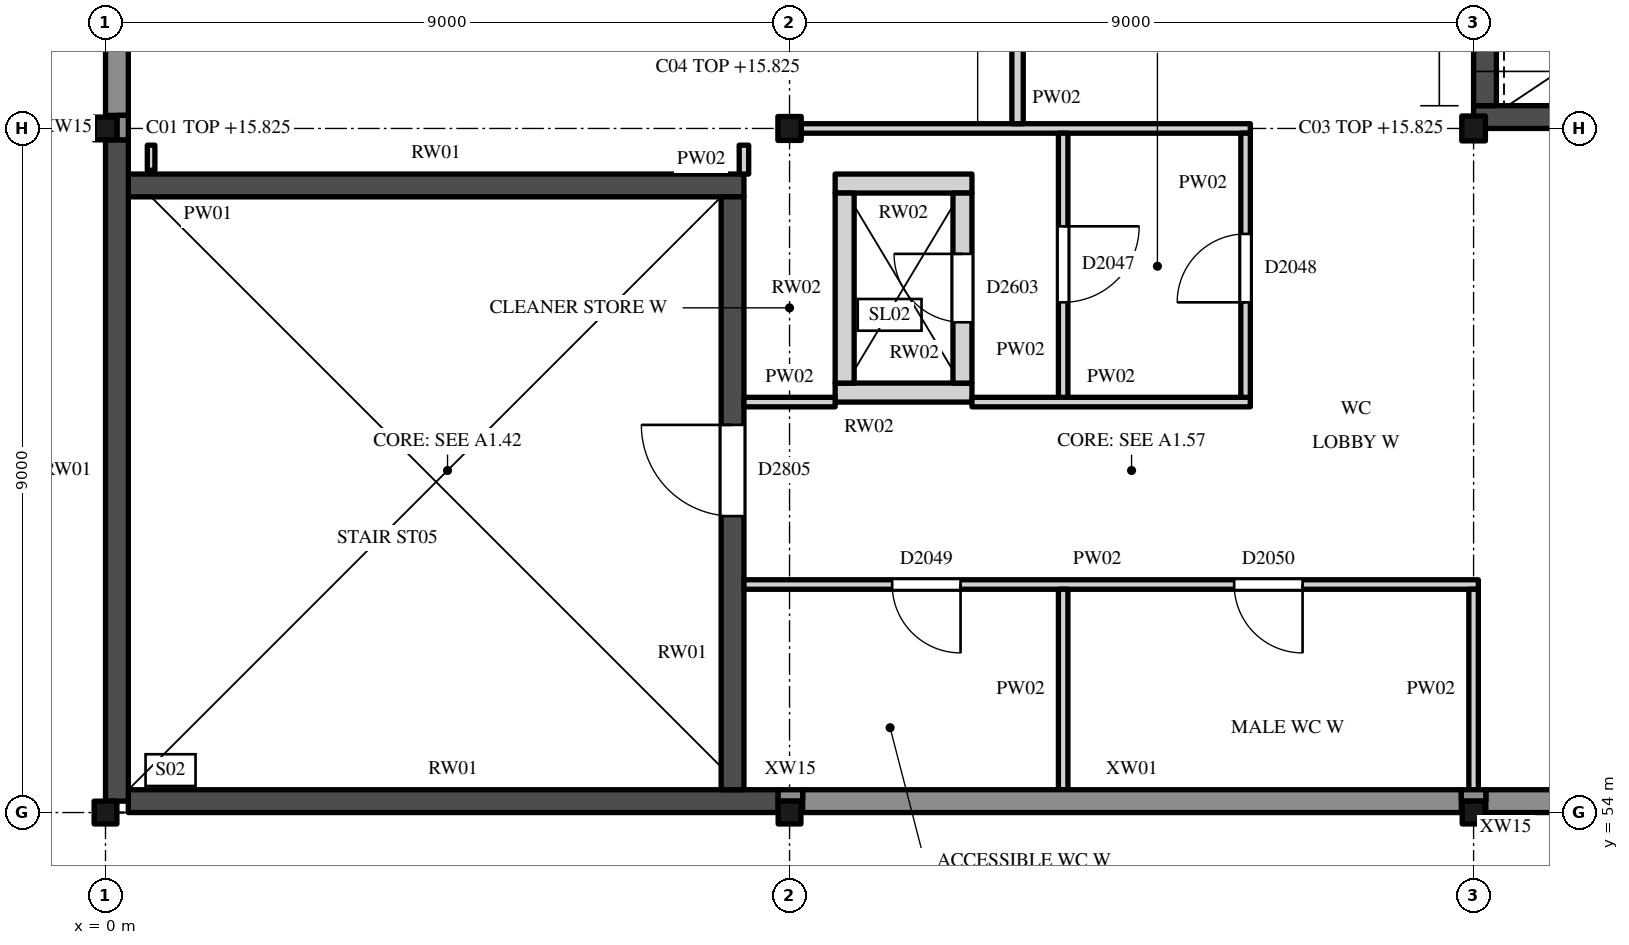
"""IFC4 building model, lengths in metres.
Left out: names, types, materials, properties, quantities, classifications, styles, units other than length and angle.
Written with IfcOpenShell. Run it as: python <this file> out.ifc"""

import sys

from ifc_helpers import new_model, si_unit, direction, frame, frame_2d, origin, origin_2d, place, context, subcontext, project, spatial, polyline, rectangle, hollow_rectangle, i_section, outline, extrude, element, fill, save


model = new_model("IFC4")
c1 = context("Model", 3, precision=1e-05, world=origin(), true_north=direction((0.0, 1.0)))
c2 = subcontext(c1, "Body", "Model", "MODEL_VIEW")
j1 = project(units=[si_unit("LENGTHUNIT", "METRE"), si_unit("PLANEANGLEUNIT", "RADIAN")], contexts=[c1])
p1 = place(None, origin())
s1 = spatial("IfcSite", under=j1, at=p1, CompositionType="ELEMENT")
p2 = place(p1, origin())
s2 = spatial("IfcBuilding", under=s1, at=p2, CompositionType="ELEMENT")
p3 = place(p2, frame((0.0, 0.0, 11.0)))
s3 = spatial("IfcBuildingStorey", under=s2, at=p3, CompositionType="ELEMENT", Elevation=11.0)
for number, where, z_axis, x_axis in (
    (1, (0.0, 54.0, 0.0), (0.0, 0.0, 1.0), (1.0, 0.0, 0.0)),
    (2, (9.0, 54.0, 0.0), (0.0, 0.0, 1.0), (1.0, 0.0, 0.0)),
    (3, (18.0, 54.0, 0.0), (0.0, 0.0, 1.0), (1.0, 0.0, 0.0)),
    (4, (0.0, 63.0, 0.0), (0.0, 0.0, 1.0), (1.0, 0.0, 0.0)),
):
    element("IfcColumn", number, at=place(p3, frame(where, z_axis=z_axis, x_axis=x_axis)), inside=s3, PredefinedType="COLUMN", context=c2, shape_type="SweptSolid", body=[
        extrude(hollow_rectangle(XDim=0.3, YDim=0.3, WallThickness=0.012, InnerFilletRadius=0.019, OuterFilletRadius=0.031, at=origin_2d()), origin(), (0.0, 0.0, 1.0), 4.825),
    ])
p4 = place(p3, frame((9.0, 63.0, 0.0), z_axis=(0.0, 0.0, 1.0), x_axis=(1.0, 0.0, 0.0)))
e5 = element("IfcColumn", 5, at=p4, inside=s3, PredefinedType="COLUMN", context=c2, shape_type="SweptSolid", body=[
    extrude(i_section(OverallWidth=0.307, OverallDepth=0.315, WebThickness=0.012, FlangeThickness=0.019, FilletRadius=0.017, at=origin_2d()), origin(), (0.0, 0.0, 1.0), 4.825),
])
p5 = place(p3, frame((18.0, 63.0, 0.0), z_axis=(0.0, 0.0, 1.0), x_axis=(1.0, 0.0, 0.0)))
e6 = element("IfcColumn", 6, at=p5, inside=s3, PredefinedType="COLUMN", context=c2, shape_type="SweptSolid", body=[
    extrude(i_section(OverallWidth=0.311, OverallDepth=0.327, WebThickness=0.016, FlangeThickness=0.025, FilletRadius=0.017, at=origin_2d()), origin(), (0.0, 0.0, 1.0), 4.825),
])
p6 = place(p3, frame((0.3, 54.15, 0.0), z_axis=(0.0, 0.0, 1.0), x_axis=(1.0, 0.0, 0.0)))
e7 = element("IfcWall", 7, at=p6, inside=s3, PredefinedType="SHEAR", context=c2, shape_type="SweptSolid", body=[
    extrude(rectangle(XDim=8.55, YDim=0.3, at=frame_2d((4.275, 0.0))), origin(), (0.0, 0.0, 1.0), 4.825),
])
p7 = place(p3, frame((0.3, 62.25, 0.0), z_axis=(0.0, 0.0, 1.0), x_axis=(1.0, 0.0, 0.0)))
e8 = element("IfcWall", 8, at=p7, inside=s3, PredefinedType="SHEAR", context=c2, shape_type="SweptSolid", body=[
    extrude(rectangle(XDim=8.1, YDim=0.3, at=frame_2d((4.05, 0.0))), origin(), (0.0, 0.0, 1.0), 4.825),
])
p8 = place(p3, frame((0.15, 54.15, 0.0), z_axis=(0.0, 0.0, 1.0), x_axis=(0.0, 1.0, 0.0)))
e9 = element("IfcWall", 9, at=p8, inside=s3, PredefinedType="SHEAR", context=c2, shape_type="SweptSolid", body=[
    extrude(rectangle(XDim=8.7, YDim=0.3, at=frame_2d((4.35, 0.0))), origin(), (0.0, 0.0, 1.0), 4.825),
])
p9 = place(p3, frame((8.25, 54.3, 0.0), z_axis=(0.0, 0.0, 1.0), x_axis=(0.0, 1.0, 0.0)))
e10 = element("IfcWall", 10, at=p9, inside=s3, PredefinedType="SHEAR", context=c2, shape_type="SweptSolid", body=[
    extrude(rectangle(XDim=7.8, YDim=0.3, at=frame_2d((3.9, 0.0))), origin(), (0.0, 0.0, 1.0), 4.825),
])
p10 = place(p9, frame((3.6, 0.0, 0.0)))
e11 = element("IfcOpeningElement", 11, at=p10, cuts=e10, PredefinedType="OPENING", context=c2, shape_type="SweptSolid", body=[
    extrude(rectangle(XDim=1.2, YDim=2.1, at=frame_2d((0.6, 1.05))), frame((0.0, 0.16, 0.0), z_axis=(0.0, -1.0, 0.0), x_axis=(1.0, 0.0, 0.0)), (0.0, 0.0, 1.0), 0.32),
])
for number, where, z_axis, x_axis in (
    (12, (9.6, 59.525, 0.0), (0.0, 0.0, 1.0), (1.0, 0.0, 0.0)),
    (13, (9.6, 62.275, 0.0), (0.0, 0.0, 1.0), (1.0, 0.0, 0.0)),
):
    element("IfcWall", number, at=place(p3, frame(where, z_axis=z_axis, x_axis=x_axis)), inside=s3, PredefinedType="STANDARD", context=c2, shape_type="SweptSolid", body=[
        extrude(rectangle(XDim=1.8, YDim=0.25, at=frame_2d((0.9, 0.0))), origin(), (0.0, 0.0, 1.0), 4.825),
    ])
p11 = place(p3, frame((9.725, 59.65, 0.0), z_axis=(0.0, 0.0, 1.0), x_axis=(0.0, 1.0, 0.0)))
e14 = element("IfcWall", 14, at=p11, inside=s3, PredefinedType="STANDARD", context=c2, shape_type="SweptSolid", body=[
    extrude(rectangle(XDim=2.5, YDim=0.25, at=frame_2d((1.25, 0.0))), origin(), (0.0, 0.0, 1.0), 4.825),
])
p12 = place(p3, frame((11.275, 59.65, 0.0), z_axis=(0.0, 0.0, 1.0), x_axis=(0.0, 1.0, 0.0)))
e15 = element("IfcWall", 15, at=p12, inside=s3, PredefinedType="STANDARD", context=c2, shape_type="SweptSolid", body=[
    extrude(rectangle(XDim=2.5, YDim=0.25, at=frame_2d((1.25, 0.0))), origin(), (0.0, 0.0, 1.0), 4.825),
])
p13 = place(p12, frame((0.8, 0.0, 0.0)))
e16 = element("IfcOpeningElement", 16, at=p13, cuts=e15, PredefinedType="OPENING", context=c2, shape_type="SweptSolid", body=[
    extrude(rectangle(XDim=0.9, YDim=2.1, at=frame_2d((0.45, 1.05))), frame((0.0, 0.135, 0.0), z_axis=(0.0, -1.0, 0.0), x_axis=(1.0, 0.0, 0.0)), (0.0, 0.0, 1.0), 0.27),
])
p14 = place(p3, frame((18.0, 63.15, 0.0), z_axis=(0.0, 0.0, 1.0), x_axis=(1.0, 0.0, 0.0)))
e17 = element("IfcWall", 17, at=p14, inside=s3, PredefinedType="SHEAR", context=c2, shape_type="SweptSolid", body=[
    extrude(rectangle(XDim=9.0, YDim=0.3, at=frame_2d((4.5, 0.0))), origin(), (0.0, 0.0, 1.0), 5.0),
])
p15 = place(p3, frame((18.15, 63.3, 0.0), z_axis=(0.0, 0.0, 1.0), x_axis=(0.0, 1.0, 0.0)))
e18 = element("IfcWall", 18, at=p15, inside=s3, PredefinedType="SHEAR", context=c2, shape_type="SweptSolid", body=[
    extrude(rectangle(XDim=8.7, YDim=0.3, at=frame_2d((4.35, 0.0))), origin(), (0.0, 0.0, 1.0), 5.0),
])
p16 = place(p3, frame((9.172, 54.15, 0.0), z_axis=(0.0, 0.0, 1.0), x_axis=(1.0, 0.0, 0.0)))
e19 = element("IfcWall", 19, at=p16, inside=s3, PredefinedType="SOLIDWALL", context=c2, shape_type="SweptSolid", body=[
    extrude(rectangle(XDim=8.667, YDim=0.3, at=frame_2d((4.333, 0.0))), origin(), (0.0, 0.0, 1.0), 4.825),
])
p17 = place(p3, frame((18.161, 54.15, 0.0), z_axis=(0.0, 0.0, 1.0), x_axis=(1.0, 0.0, 0.0)))
e20 = element("IfcWall", 20, at=p17, inside=s3, PredefinedType="SOLIDWALL", context=c2, shape_type="SweptSolid", body=[
    extrude(rectangle(XDim=8.678, YDim=0.3, at=frame_2d((4.339, 0.0))), origin(), (0.0, 0.0, 1.0), 4.825),
])
p18 = place(p3, frame((0.15, 63.172, 0.0), z_axis=(0.0, 0.0, 1.0), x_axis=(0.0, 1.0, 0.0)))
e21 = element("IfcWall", 21, at=p18, inside=s3, PredefinedType="SOLIDWALL", context=c2, shape_type="SweptSolid", body=[
    extrude(rectangle(XDim=8.667, YDim=0.3, at=frame_2d((4.333, 0.0))), origin(), (0.0, 0.0, 1.0), 4.825),
])
p19 = place(p18, frame((3.728, 0.0, 1.0)))
e22 = element("IfcOpeningElement", 22, at=p19, cuts=e21, PredefinedType="OPENING", context=c2, shape_type="SweptSolid", body=[
    extrude(rectangle(XDim=1.2, YDim=3.0, at=frame_2d((0.6, 1.5))), frame((0.0, 0.16, 0.0), z_axis=(0.0, -1.0, 0.0), x_axis=(1.0, 0.0, 0.0)), (0.0, 0.0, 1.0), 0.32),
])
p20 = place(p3, frame((8.85, 54.225, 0.0), z_axis=(0.0, 0.0, 1.0), x_axis=(1.0, 0.0, 0.0)))
e23 = element("IfcWall", 23, at=p20, inside=s3, PredefinedType="SOLIDWALL", context=c2, shape_type="SweptSolid", body=[
    extrude(rectangle(XDim=0.322, YDim=0.15, at=frame_2d((0.161, 0.0))), origin(), (0.0, 0.0, 1.0), 4.825),
])
p21 = place(p3, frame((17.839, 54.225, 0.0), z_axis=(0.0, 0.0, 1.0), x_axis=(1.0, 0.0, 0.0)))
e24 = element("IfcWall", 24, at=p21, inside=s3, PredefinedType="SOLIDWALL", context=c2, shape_type="SweptSolid", body=[
    extrude(rectangle(XDim=0.322, YDim=0.15, at=frame_2d((0.161, 0.0))), origin(), (0.0, 0.0, 1.0), 4.825),
])
p22 = place(p3, frame((0.225, 62.85, 0.0), z_axis=(0.0, 0.0, 1.0), x_axis=(0.0, 1.0, 0.0)))
e25 = element("IfcWall", 25, at=p22, inside=s3, PredefinedType="SOLIDWALL", context=c2, shape_type="SweptSolid", body=[
    extrude(rectangle(XDim=0.322, YDim=0.15, at=frame_2d((0.161, 0.0))), origin(), (0.0, 0.0, 1.0), 4.825),
])
p23 = place(p3, frame((18.2, 63.3, 5.0), z_axis=(0.0, 0.0, 1.0), x_axis=(0.0, 1.0, 0.0)))
e26 = element("IfcWall", 26, at=p23, inside=s3, PredefinedType="SOLIDWALL", context=c2, shape_type="SweptSolid", body=[
    extrude(rectangle(XDim=17.4, YDim=0.4, at=frame_2d((8.7, 0.0))), origin(), (0.0, 0.0, 1.0), 6.638),
])
p24 = place(p3, frame((18.0, 63.15, 5.0), z_axis=(0.0, 0.0, 1.0), x_axis=(1.0, 0.0, 0.0)))
e27 = element("IfcWall", 27, at=p24, inside=s3, PredefinedType="SOLIDWALL", context=c2, shape_type="SweptSolid", body=[
    extrude(outline(polyline([(0.0, 0.0), (25.5, 0.0), (25.5, 0.131), (0.0, 6.742), (0.0, 0.0)])), frame((0.0, 0.15, 0.0), z_axis=(0.0, -1.0, 0.0), x_axis=(1.0, 0.0, 0.0)), (0.0, 0.0, 1.0), 0.3),
])
for number, where, z_axis, x_axis in (
    (28, (1.5, 56.325, 5.0), (0.0, 0.0, 1.0), (1.0, 0.0, 0.0)),
    (29, (1.5, 60.675, 5.0), (0.0, 0.0, 1.0), (1.0, 0.0, 0.0)),
):
    element("IfcWall", number, at=place(p3, frame(where, z_axis=z_axis, x_axis=x_axis)), inside=s3, PredefinedType="PARAPET", context=c2, shape_type="SweptSolid", body=[
        extrude(rectangle(XDim=6.0, YDim=0.15, at=frame_2d((3.0, 0.0))), origin(), (0.0, 0.0, 1.0), 0.5),
    ])
for number, where, z_axis, x_axis in (
    (30, (1.575, 56.4, 5.0), (0.0, 0.0, 1.0), (0.0, 1.0, 0.0)),
    (31, (7.425, 56.4, 5.0), (0.0, 0.0, 1.0), (0.0, 1.0, 0.0)),
):
    element("IfcWall", number, at=place(p3, frame(where, z_axis=z_axis, x_axis=x_axis)), inside=s3, PredefinedType="PARAPET", context=c2, shape_type="SweptSolid", body=[
        extrude(rectangle(XDim=4.2, YDim=0.15, at=frame_2d((2.1, 0.0))), origin(), (0.0, 0.0, 1.0), 0.5),
    ])
for number, where, z_axis, x_axis in (
    (32, (10.5, 56.325, 5.0), (0.0, 0.0, 1.0), (1.0, 0.0, 0.0)),
    (33, (10.5, 60.675, 5.0), (0.0, 0.0, 1.0), (1.0, 0.0, 0.0)),
):
    element("IfcWall", number, at=place(p3, frame(where, z_axis=z_axis, x_axis=x_axis)), inside=s3, PredefinedType="PARAPET", context=c2, shape_type="SweptSolid", body=[
        extrude(rectangle(XDim=6.0, YDim=0.15, at=frame_2d((3.0, 0.0))), origin(), (0.0, 0.0, 1.0), 0.5),
    ])
for number, where, z_axis, x_axis in (
    (34, (10.575, 56.4, 5.0), (0.0, 0.0, 1.0), (0.0, 1.0, 0.0)),
    (35, (16.425, 56.4, 5.0), (0.0, 0.0, 1.0), (0.0, 1.0, 0.0)),
):
    element("IfcWall", number, at=place(p3, frame(where, z_axis=z_axis, x_axis=x_axis)), inside=s3, PredefinedType="PARAPET", context=c2, shape_type="SweptSolid", body=[
        extrude(rectangle(XDim=4.2, YDim=0.15, at=frame_2d((2.1, 0.0))), origin(), (0.0, 0.0, 1.0), 0.5),
    ])
p25 = place(p3, frame((8.4, 57.0, 0.0), z_axis=(0.0, 0.0, 1.0), x_axis=(1.0, 0.0, 0.0)))
e36 = element("IfcWall", 36, at=p25, inside=s3, PredefinedType="PARTITIONING", context=c2, shape_type="SweptSolid", body=[
    extrude(rectangle(XDim=9.663, YDim=0.125, at=frame_2d((4.831, 0.0))), origin(), (0.0, 0.0, 1.0), 4.422),
])
p26 = place(p25, frame((1.95, 0.0, 0.0)))
e37 = element("IfcOpeningElement", 37, at=p26, cuts=e36, PredefinedType="OPENING", context=c2, shape_type="SweptSolid", body=[
    extrude(rectangle(XDim=0.9, YDim=2.1, at=frame_2d((0.45, 1.05))), frame((0.0, 0.073, 0.0), z_axis=(0.0, -1.0, 0.0), x_axis=(1.0, 0.0, 0.0)), (0.0, 0.0, 1.0), 0.145),
])
p27 = place(p25, frame((6.45, 0.0, 0.0)))
e38 = element("IfcOpeningElement", 38, at=p27, cuts=e36, PredefinedType="OPENING", context=c2, shape_type="SweptSolid", body=[
    extrude(rectangle(XDim=0.9, YDim=2.1, at=frame_2d((0.45, 1.05))), frame((0.0, 0.073, 0.0), z_axis=(0.0, -1.0, 0.0), x_axis=(1.0, 0.0, 0.0)), (0.0, 0.0, 1.0), 0.145),
])
p28 = place(p3, frame((8.4, 59.4, 0.0), z_axis=(0.0, 0.0, 1.0), x_axis=(1.0, 0.0, 0.0)))
e39 = element("IfcWall", 39, at=p28, inside=s3, PredefinedType="PARTITIONING", context=c2, shape_type="SweptSolid", body=[
    extrude(rectangle(XDim=1.2, YDim=0.125, at=frame_2d((0.6, 0.0))), origin(), (0.0, 0.0, 1.0), 4.742),
])
p29 = place(p3, frame((11.4, 59.4, 0.0), z_axis=(0.0, 0.0, 1.0), x_axis=(1.0, 0.0, 0.0)))
e40 = element("IfcWall", 40, at=p29, inside=s3, PredefinedType="PARTITIONING", context=c2, shape_type="SweptSolid", body=[
    extrude(rectangle(XDim=3.663, YDim=0.125, at=frame_2d((1.831, 0.0))), origin(), (0.0, 0.0, 1.0), 4.742),
])
p30 = place(p3, frame((9.154, 63.0, 0.0), z_axis=(0.0, 0.0, 1.0), x_axis=(1.0, 0.0, 0.0)))
e41 = element("IfcWall", 41, at=p30, inside=s3, PredefinedType="PARTITIONING", context=c2, shape_type="SweptSolid", body=[
    extrude(rectangle(XDim=5.909, YDim=0.125, at=frame_2d((2.955, 0.0))), origin(), (0.0, 0.0, 1.0), 4.469),
])
p31 = place(p3, frame((0.6, 62.45, 0.0), z_axis=(0.0, 0.0, 1.0), x_axis=(0.0, 1.0, 0.0)))
e42 = element("IfcWall", 42, at=p31, inside=s3, PredefinedType="PARTITIONING", context=c2, shape_type="SweptSolid", body=[
    extrude(rectangle(XDim=0.33, YDim=0.1, at=frame_2d((0.165, 0.0))), origin(), (0.0, 0.0, 1.0), 4.742),
])
p32 = place(p3, frame((8.4, 62.4, 0.0), z_axis=(0.0, 0.0, 1.0), x_axis=(0.0, 1.0, 0.0)))
e43 = element("IfcWall", 43, at=p32, inside=s3, PredefinedType="PARTITIONING", context=c2, shape_type="SweptSolid", body=[
    extrude(rectangle(XDim=0.38, YDim=0.125, at=frame_2d((0.19, 0.0))), origin(), (0.0, 0.0, 1.0), 4.742),
])
p33 = place(p3, frame((12.0, 63.062, 0.0), z_axis=(0.0, 0.0, 1.0), x_axis=(0.0, 1.0, 0.0)))
e44 = element("IfcWall", 44, at=p33, inside=s3, PredefinedType="PARTITIONING", context=c2, shape_type="SweptSolid", body=[
    extrude(rectangle(XDim=17.863, YDim=0.15, at=frame_2d((8.931, 0.0))), origin(), (0.0, 0.0, 1.0), 4.742),
])
p34 = place(p33, frame((8.05, 0.0, 0.0)))
e45 = element("IfcOpeningElement", 45, at=p34, cuts=e44, PredefinedType="OPENING", context=c2, shape_type="SweptSolid", body=[
    extrude(rectangle(XDim=1.8, YDim=2.4, at=frame_2d((0.9, 1.2))), frame((0.0, 0.085, 0.0), z_axis=(0.0, -1.0, 0.0), x_axis=(1.0, 0.0, 0.0)), (0.0, 0.0, 1.0), 0.17),
])
p35 = place(p3, frame((12.6, 54.3, 0.0), z_axis=(0.0, 0.0, 1.0), x_axis=(0.0, 1.0, 0.0)))
e46 = element("IfcWall", 46, at=p35, inside=s3, PredefinedType="PARTITIONING", context=c2, shape_type="SweptSolid", body=[
    extrude(rectangle(XDim=2.637, YDim=0.125, at=frame_2d((1.319, 0.0))), origin(), (0.0, 0.0, 1.0), 4.742),
])
p36 = place(p3, frame((12.6, 59.462, 0.0), z_axis=(0.0, 0.0, 1.0), x_axis=(0.0, 1.0, 0.0)))
e47 = element("IfcWall", 47, at=p36, inside=s3, PredefinedType="PARTITIONING", context=c2, shape_type="SweptSolid", body=[
    extrude(rectangle(XDim=3.475, YDim=0.125, at=frame_2d((1.738, 0.0))), origin(), (0.0, 0.0, 1.0), 4.742),
])
p37 = place(p36, frame((1.25, 0.0, 0.0)))
e48 = element("IfcOpeningElement", 48, at=p37, cuts=e47, PredefinedType="OPENING", context=c2, shape_type="SweptSolid", body=[
    extrude(rectangle(XDim=1.0, YDim=2.1, at=frame_2d((0.5, 1.05))), frame((0.0, 0.073, 0.0), z_axis=(0.0, -1.0, 0.0), x_axis=(1.0, 0.0, 0.0)), (0.0, 0.0, 1.0), 0.145),
])
p38 = place(p3, frame((15.0, 59.462, 0.0), z_axis=(0.0, 0.0, 1.0), x_axis=(0.0, 1.0, 0.0)))
e49 = element("IfcWall", 49, at=p38, inside=s3, PredefinedType="PARTITIONING", context=c2, shape_type="SweptSolid", body=[
    extrude(rectangle(XDim=3.475, YDim=0.125, at=frame_2d((1.738, 0.0))), origin(), (0.0, 0.0, 1.0), 4.742),
])
p39 = place(p38, frame((1.25, 0.0, 0.0)))
e50 = element("IfcOpeningElement", 50, at=p39, cuts=e49, PredefinedType="OPENING", context=c2, shape_type="SweptSolid", body=[
    extrude(rectangle(XDim=0.9, YDim=2.1, at=frame_2d((0.45, 1.05))), frame((0.0, 0.073, 0.0), z_axis=(0.0, -1.0, 0.0), x_axis=(1.0, 0.0, 0.0)), (0.0, 0.0, 1.0), 0.145),
])
p40 = place(p3, frame((18.0, 54.3, 0.0), z_axis=(0.0, 0.0, 1.0), x_axis=(0.0, 1.0, 0.0)))
e51 = element("IfcWall", 51, at=p40, inside=s3, PredefinedType="PARTITIONING", context=c2, shape_type="SweptSolid", body=[
    extrude(rectangle(XDim=2.637, YDim=0.125, at=frame_2d((1.319, 0.0))), origin(), (0.0, 0.0, 1.0), 4.371),
])
p41 = place(p10, origin())
e52 = element("IfcDoor", 52, at=p41, inside=s3, OperationType="SINGLE_SWING_LEFT", PredefinedType="DOOR", context=c2, shape_type="SweptSolid", body=[
    extrude(rectangle(XDim=1.2, YDim=2.1, at=frame_2d((0.6, 1.05))), frame((0.0, 0.025, 0.0), z_axis=(0.0, -1.0, 0.0), x_axis=(1.0, 0.0, 0.0)), (0.0, 0.0, 1.0), 0.05),
])
fill(e11, e52)
p42 = place(p13, origin())
e53 = element("IfcDoor", 53, at=p42, inside=s3, OperationType="SINGLE_SWING_LEFT", PredefinedType="DOOR", context=c2, shape_type="SweptSolid", body=[
    extrude(rectangle(XDim=0.9, YDim=2.1, at=frame_2d((0.45, 1.05))), frame((0.0, 0.025, 0.0), z_axis=(0.0, -1.0, 0.0), x_axis=(1.0, 0.0, 0.0)), (0.0, 0.0, 1.0), 0.05),
])
fill(e16, e53)
p43 = place(p37, origin())
e54 = element("IfcDoor", 54, at=p43, inside=s3, OperationType="SINGLE_SWING_RIGHT", PredefinedType="DOOR", context=c2, shape_type="SweptSolid", body=[
    extrude(rectangle(XDim=1.0, YDim=2.1, at=frame_2d((0.5, 1.05))), frame((0.0, 0.025, 0.0), z_axis=(0.0, -1.0, 0.0), x_axis=(1.0, 0.0, 0.0)), (0.0, 0.0, 1.0), 0.05),
])
fill(e48, e54)
p44 = place(p39, origin())
e55 = element("IfcDoor", 55, at=p44, inside=s3, OperationType="SINGLE_SWING_RIGHT", PredefinedType="DOOR", context=c2, shape_type="SweptSolid", body=[
    extrude(rectangle(XDim=0.9, YDim=2.1, at=frame_2d((0.45, 1.05))), frame((0.0, 0.025, 0.0), z_axis=(0.0, -1.0, 0.0), x_axis=(1.0, 0.0, 0.0)), (0.0, 0.0, 1.0), 0.05),
])
fill(e50, e55)
p45 = place(p26, origin())
e56 = element("IfcDoor", 56, at=p45, inside=s3, OperationType="SINGLE_SWING_RIGHT", PredefinedType="DOOR", context=c2, shape_type="SweptSolid", body=[
    extrude(rectangle(XDim=0.9, YDim=2.1, at=frame_2d((0.45, 1.05))), frame((0.0, 0.025, 0.0), z_axis=(0.0, -1.0, 0.0), x_axis=(1.0, 0.0, 0.0)), (0.0, 0.0, 1.0), 0.05),
])
fill(e37, e56)
p46 = place(p27, origin())
e57 = element("IfcDoor", 57, at=p46, inside=s3, OperationType="SINGLE_SWING_RIGHT", PredefinedType="DOOR", context=c2, shape_type="SweptSolid", body=[
    extrude(rectangle(XDim=0.9, YDim=2.1, at=frame_2d((0.45, 1.05))), frame((0.0, 0.025, 0.0), z_axis=(0.0, -1.0, 0.0), x_axis=(1.0, 0.0, 0.0)), (0.0, 0.0, 1.0), 0.05),
])
fill(e38, e57)
save(model, sys.argv[1])
